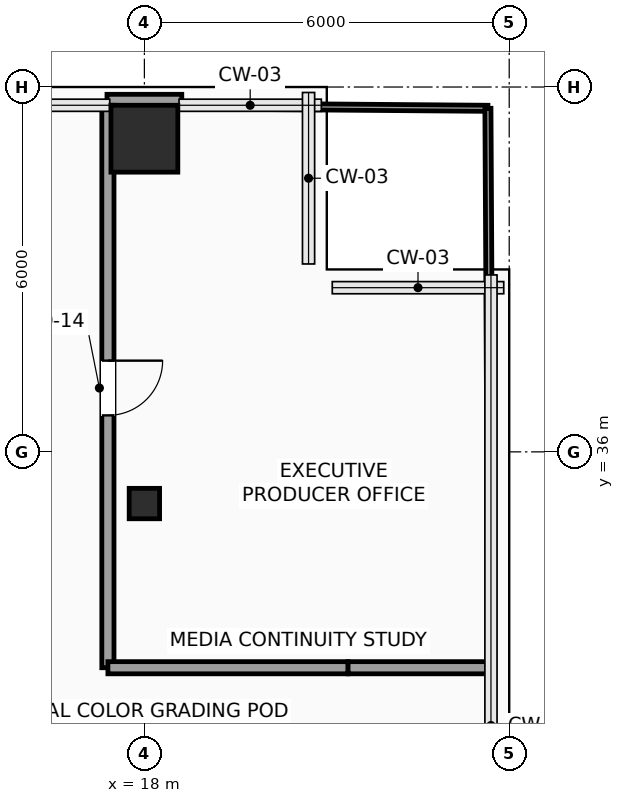
"""IFC4 building model, lengths in metres.
Left out: names, types, materials, properties, quantities, classifications, styles, units other than length and angle.
Written with IfcOpenShell. Run it as: python <this file> out.ifc"""

import sys

from ifc_helpers import new_model, si_unit, direction, frame, frame_2d, origin, origin_2d, place, context, subcontext, project, spatial, rectangle, hollow_rectangle, extrude, element, fill, save


model = new_model("IFC4")
c1 = context("Model", 3, precision=1e-05, world=origin(), true_north=direction((0.0, 1.0)))
c2 = subcontext(c1, "Body", "Model", "MODEL_VIEW")
j1 = project(units=[si_unit("LENGTHUNIT", "METRE"), si_unit("PLANEANGLEUNIT", "RADIAN")], contexts=[c1])
p1 = place(None, origin())
s1 = spatial("IfcSite", under=j1, at=p1, CompositionType="ELEMENT")
p2 = place(p1, origin())
s2 = spatial("IfcBuilding", under=s1, at=p2, CompositionType="ELEMENT")
p3 = place(p2, frame((0.0, 0.0, 145.65)))
s3 = spatial("IfcBuildingStorey", under=s2, at=p3, CompositionType="ELEMENT", Elevation=145.65)
p4 = place(p3, frame((18.0, 35.15, 0.0), z_axis=(0.0, 0.0, 1.0), x_axis=(1.0, 0.0, 0.0)))
e1 = element("IfcColumn", 1, at=p4, inside=s3, PredefinedType="COLUMN", context=c2, shape_type="SweptSolid", body=[
    extrude(hollow_rectangle(XDim=0.5, YDim=0.5, WallThickness=0.025, InnerFilletRadius=0.025, OuterFilletRadius=0.04, at=origin_2d()), origin(), (0.0, 0.0, 1.0), 3.75),
])
p5 = place(p3, frame((18.0, 41.15, 0.0), z_axis=(0.0, 0.0, 1.0), x_axis=(1.0, 0.0, 0.0)))
e2 = element("IfcColumn", 2, at=p5, inside=s3, PredefinedType="COLUMN", context=c2, shape_type="SweptSolid", body=[
    extrude(rectangle(XDim=1.1, YDim=1.1, at=origin_2d()), origin(), (0.0, 0.0, 1.0), 3.75),
])
p6 = place(p3, frame((17.385, 41.76, 0.0), z_axis=(0.0, 0.0, 1.0), x_axis=(1.0, 0.0, 0.0)))
e3 = element("IfcWall", 3, at=p6, inside=s3, PredefinedType="SOLIDWALL", context=c2, shape_type="SweptSolid", body=[
    extrude(rectangle(XDim=1.23, YDim=0.24, at=frame_2d((0.615, 0.0))), origin(), (0.0, 0.0, 1.0), 3.525),
])
p7 = place(p3, frame((17.4, 41.7, 0.0), z_axis=(0.0, 0.0, 1.0), x_axis=(0.0, -1.0, 0.0)))
e4 = element("IfcWall", 4, at=p7, inside=s3, PredefinedType="PARTITIONING", context=c2, shape_type="SweptSolid", body=[
    extrude(rectangle(XDim=9.25, YDim=0.2, at=frame_2d((4.625, 0.0))), origin(), (0.0, 0.0, 1.0), 3.525),
])
p8 = place(p7, frame((4.2, 0.0, 0.0)))
e5 = element("IfcOpeningElement", 5, at=p8, cuts=e4, PredefinedType="OPENING", context=c2, shape_type="SweptSolid", body=[
    extrude(rectangle(XDim=0.9, YDim=2.1, at=frame_2d((0.45, 1.05))), frame((0.0, 0.11, 0.0), z_axis=(0.0, -1.0, 0.0), x_axis=(1.0, 0.0, 0.0)), (0.0, 0.0, 1.0), 0.22),
])
p9 = place(p3, frame((17.4, 32.45, 0.0), z_axis=(0.0, 0.0, 1.0), x_axis=(1.0, 0.0, 0.0)))
e6 = element("IfcWall", 6, at=p9, inside=s3, PredefinedType="PARTITIONING", context=c2, shape_type="SweptSolid", body=[
    extrude(rectangle(XDim=3.95, YDim=0.2, at=frame_2d((1.975, 0.0))), origin(), (0.0, 0.0, 1.0), 3.525),
])
p10 = place(p3, frame((21.35, 32.45, 0.0), z_axis=(0.0, 0.0, 1.0), x_axis=(1.0, 0.0, 0.0)))
e7 = element("IfcWall", 7, at=p10, inside=s3, PredefinedType="PARTITIONING", context=c2, shape_type="SweptSolid", body=[
    extrude(rectangle(XDim=2.35, YDim=0.2, at=frame_2d((1.175, 0.0))), origin(), (0.0, 0.0, 1.0), 3.525),
])
p11 = place(p3, frame((18.615, 41.69, 0.0), z_axis=(0.0, 0.0, 1.0), x_axis=(0.99996799533, -0.008000519771, 0.0)))
e8 = element("IfcWall", 8, at=p11, inside=s3, PredefinedType="PARTITIONING", context=c2, shape_type="SweptSolid", body=[
    extrude(rectangle(XDim=5.035, YDim=0.1, at=frame_2d((2.518, 0.0))), origin(), (0.0, 0.0, 1.0), 3.525),
])
p12 = place(p3, frame((23.7, 32.45, 0.0), z_axis=(0.0, 0.0, 1.0), x_axis=(-0.005440038388, 0.999985202882, 0.0)))
e9 = element("IfcWall", 9, at=p12, inside=s3, PredefinedType="PARTITIONING", context=c2, shape_type="SweptSolid", body=[
    extrude(rectangle(XDim=9.2, YDim=0.1, at=frame_2d((4.6, 0.0))), origin(), (0.0, 0.0, 1.0), 3.525),
])
p13 = place(p8, origin())
e10 = element("IfcDoor", 10, at=p13, inside=s3, OperationType="SINGLE_SWING_LEFT", PredefinedType="DOOR", context=c2, shape_type="SweptSolid", body=[
    extrude(rectangle(XDim=0.9, YDim=2.1, at=frame_2d((0.45, 1.05))), frame((0.0, 0.025, 0.0), z_axis=(0.0, -1.0, 0.0), x_axis=(1.0, 0.0, 0.0)), (0.0, 0.0, 1.0), 0.05),
])
fill(e5, e10)
save(model, sys.argv[1])
